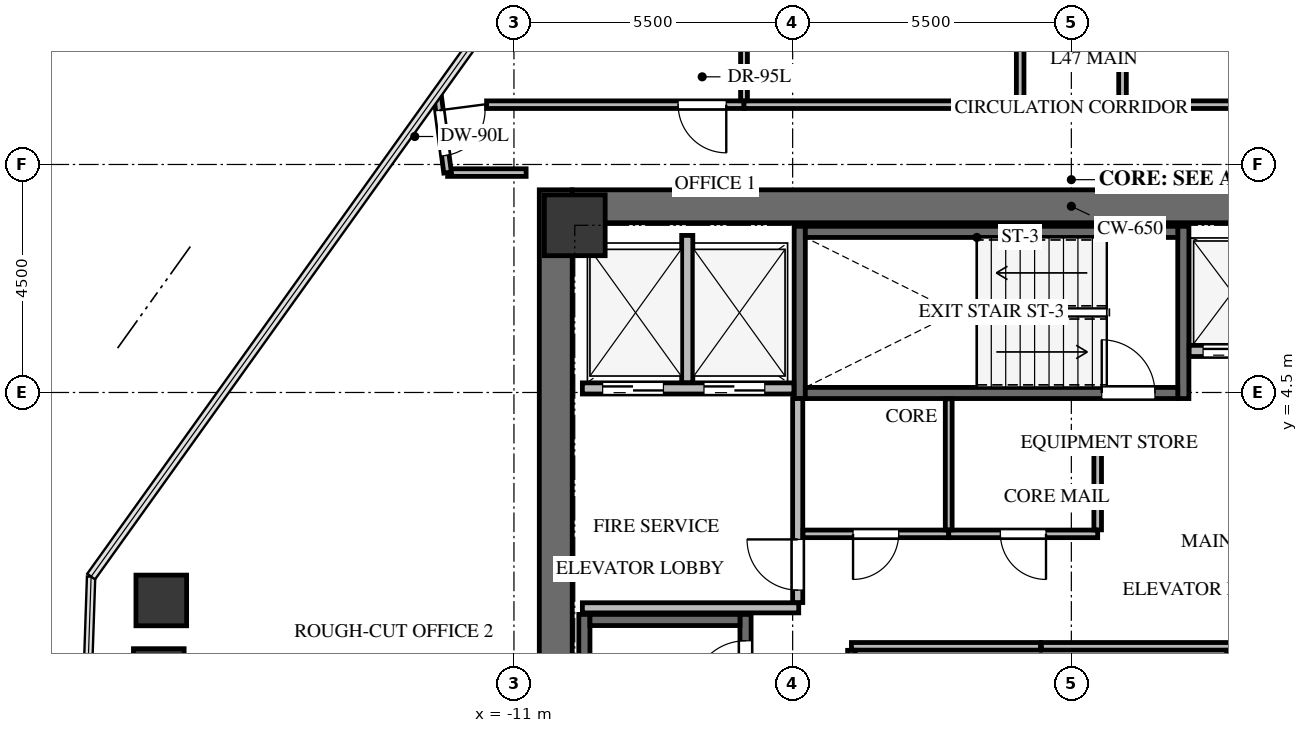
"""IFC4 building model, lengths in metres.
Left out: names, types, materials, properties, quantities, classifications, styles, units other than length and angle.
Written with IfcOpenShell. Run it as: python <this file> out.ifc"""

import sys

from ifc_helpers import new_model, si_unit, direction, frame, frame_2d, origin, origin_2d, place, context, subcontext, project, spatial, rectangle, extrude, source, transform, mapped, element, fill, save


model = new_model("IFC4")
c1 = context("Model", 3, precision=1e-05, world=origin(), true_north=direction((0.0, 1.0)))
c2 = subcontext(c1, "Body", "Model", "MODEL_VIEW")
j1 = project(units=[si_unit("LENGTHUNIT", "METRE"), si_unit("PLANEANGLEUNIT", "RADIAN")], contexts=[c1])
p1 = place(None, origin())
s1 = spatial("IfcSite", under=j1, at=p1, CompositionType="ELEMENT")
p2 = place(p1, origin())
s2 = spatial("IfcBuilding", under=s1, at=p2, CompositionType="ELEMENT")
p3 = place(p2, frame((0.0, 0.0, 173.8)))
s3 = spatial("IfcBuildingStorey", under=s2, at=p3, CompositionType="ELEMENT", Elevation=173.8)
p4 = place(p3, frame((-10.175, -8.5, 0.0), z_axis=(0.0, 0.0, 1.0), x_axis=(0.0, 1.0, 0.0)))
e1 = element("IfcWall", 1, at=p4, inside=s3, PredefinedType="SHEAR", context=c2, shape_type="SweptSolid", body=[
    extrude(rectangle(XDim=17.0, YDim=0.65, at=frame_2d((8.5, 0.0))), origin(), (0.0, 0.0, 1.0), 3.3),
])
p5 = place(p3, frame((-9.85, 8.175, 0.0), z_axis=(0.0, 0.0, 1.0), x_axis=(1.0, 0.0, 0.0)))
e2 = element("IfcWall", 2, at=p5, inside=s3, PredefinedType="SHEAR", context=c2, shape_type="SweptSolid", body=[
    extrude(rectangle(XDim=19.7, YDim=0.65, at=frame_2d((9.85, 0.0))), origin(), (0.0, 0.0, 1.0), 3.3),
])
p6 = place(p3, frame((-6.43, -7.77, -0.24), z_axis=(0.0, 0.0, 1.0), x_axis=(0.0, 1.0, 0.0)))
e3 = element("IfcWall", 3, at=p6, inside=s3, PredefinedType="SHEAR", context=c2, shape_type="SweptSolid", body=[
    extrude(rectangle(XDim=7.89, YDim=0.22, at=frame_2d((3.945, 0.0))), origin(), (0.0, 0.0, 1.0), 3.3),
])
p7 = place(p6, frame((6.32, 0.0, 0.0)))
e4 = element("IfcOpeningElement", 4, at=p7, cuts=e3, PredefinedType="OPENING", context=c2, shape_type="SweptSolid", body=[
    extrude(rectangle(XDim=1.05, YDim=2.15, at=frame_2d((0.525, 1.075))), frame((0.0, 0.12, 0.0), z_axis=(0.0, -1.0, 0.0), x_axis=(1.0, 0.0, 0.0)), (0.0, 0.0, 1.0), 0.24),
])
p8 = place(p3, frame((-9.61, 0.12, -0.24), z_axis=(0.0, 0.0, 1.0), x_axis=(0.0, -1.0, 0.0)))
e5 = element("IfcWall", 5, at=p8, inside=s3, PredefinedType="SHEAR", context=c2, shape_type="SweptSolid", body=[
    extrude(rectangle(XDim=7.89, YDim=0.22, at=frame_2d((3.945, 0.0))), origin(), (0.0, 0.0, 1.0), 3.3),
])
p9 = place(p3, frame((-6.54, 0.01, -0.24), z_axis=(0.0, 0.0, 1.0), x_axis=(-1.0, 0.0, 0.0)))
e6 = element("IfcWall", 6, at=p9, inside=s3, PredefinedType="SHEAR", context=c2, shape_type="SweptSolid", body=[
    extrude(rectangle(XDim=2.96, YDim=0.22, at=frame_2d((1.48, 0.0))), origin(), (0.0, 0.0, 1.0), 3.3),
])
for number, where, z_axis, x_axis in (
    (7, (2.21, 4.38, -0.24), (0.0, 0.0, 1.0), (0.0, 1.0, 0.0)),
    (8, (-5.36, 7.78, -0.24), (0.0, 0.0, 1.0), (0.0, -1.0, 0.0)),
):
    element("IfcWall", number, at=place(p3, frame(where, z_axis=z_axis, x_axis=x_axis)), inside=s3, PredefinedType="SHEAR", context=c2, shape_type="SweptSolid", body=[
        extrude(rectangle(XDim=3.4, YDim=0.22, at=frame_2d((1.7, 0.0))), origin(), (0.0, 0.0, 1.0), 3.3),
    ])
p10 = place(p3, frame((-5.25, 4.49, -0.24), z_axis=(0.0, 0.0, 1.0), x_axis=(1.0, 0.0, 0.0)))
e9 = element("IfcWall", 9, at=p10, inside=s3, PredefinedType="SHEAR", context=c2, shape_type="SweptSolid", body=[
    extrude(rectangle(XDim=7.35, YDim=0.22, at=frame_2d((3.675, 0.0))), origin(), (0.0, 0.0, 1.0), 3.3),
])
p11 = place(p10, frame((5.85, 0.0, 0.0)))
e10 = element("IfcOpeningElement", 10, at=p11, cuts=e9, PredefinedType="OPENING", context=c2, shape_type="SweptSolid", body=[
    extrude(rectangle(XDim=1.05, YDim=2.15, at=frame_2d((0.525, 1.075))), frame((0.0, 0.12, 0.0), z_axis=(0.0, -1.0, 0.0), x_axis=(1.0, 0.0, 0.0)), (0.0, 0.0, 1.0), 0.24),
])
p12 = place(p3, frame((2.1, 7.67, -0.24), z_axis=(0.0, 0.0, 1.0), x_axis=(-1.0, 0.0, 0.0)))
e11 = element("IfcWall", 11, at=p12, inside=s3, PredefinedType="SHEAR", context=c2, shape_type="SweptSolid", body=[
    extrude(rectangle(XDim=7.35, YDim=0.22, at=frame_2d((3.675, 0.0))), origin(), (0.0, 0.0, 1.0), 3.3),
])
m1 = source(origin(), c2, "Body", "SweptSolid", [
    extrude(rectangle(XDim=1.2, YDim=1.2, at=origin_2d()), origin(), (0.0, 0.0, 1.0), 3.3),
])
p13 = place(p3, frame((-9.8, 7.8, -0.24), z_axis=(0.0, 0.0, 1.0), x_axis=(1.0, 0.0, 0.0)))
e12 = element("IfcColumn", 12, at=p13, inside=s3, PredefinedType="COLUMN", context=c2, shape_type="MappedRepresentation", body=[
    mapped(m1, transform((0.0, 0.0, 0.0), x_axis=(1.0, 0.0, 0.0), y_axis=(0.0, 1.0, 0.0), z_axis=(0.0, 0.0, 1.0), scale=1.0)),
])
m2 = source(origin(), c2, "Body", "SweptSolid", [
    extrude(rectangle(XDim=1.0, YDim=1.0, at=origin_2d()), origin(), (0.0, 0.0, 1.0), 3.3),
])
for number, where, z_axis, x_axis in (
    (13, (-18.009, -1.057, -0.24), (0.0, 0.0, 1.0), (1.0, 0.0, 0.0)),
    (14, (-17.96, 0.396, -0.24), (0.0, 0.0, 1.0), (1.0, 0.0, 0.0)),
):
    element("IfcColumn", number, at=place(p3, frame(where, z_axis=z_axis, x_axis=x_axis)), inside=s3, PredefinedType="COLUMN", context=c2, shape_type="MappedRepresentation", body=[
        mapped(m2, transform((0.0, 0.0, 0.0), x_axis=(1.0, 0.0, 0.0), y_axis=(0.0, 1.0, 0.0), z_axis=(0.0, 0.0, 1.0), scale=1.0)),
    ])
p14 = place(p3, frame((-9.65, 4.58, 0.0), z_axis=(0.0, 0.0, 1.0), x_axis=(1.0, 0.0, 0.0)))
e15 = element("IfcWall", 15, at=p14, inside=s3, PredefinedType="SOLIDWALL", context=c2, shape_type="SweptSolid", body=[
    extrude(rectangle(XDim=4.175, YDim=0.22, at=frame_2d((2.087, 0.0))), origin(), (0.0, 0.0, 1.0), 3.045),
])
p15 = place(p14, frame((0.4, 0.0, 0.0)))
e16 = element("IfcOpeningElement", 16, at=p15, cuts=e15, PredefinedType="OPENING", context=c2, shape_type="SweptSolid", body=[
    extrude(rectangle(XDim=1.2, YDim=2.15, at=frame_2d((0.6, 1.075))), frame((0.0, 0.12, 0.0), z_axis=(0.0, -1.0, 0.0), x_axis=(1.0, 0.0, 0.0)), (0.0, 0.0, 1.0), 0.24),
])
p16 = place(p14, frame((2.4, 0.0, 0.0)))
e17 = element("IfcOpeningElement", 17, at=p16, cuts=e15, PredefinedType="OPENING", context=c2, shape_type="SweptSolid", body=[
    extrude(rectangle(XDim=1.2, YDim=2.15, at=frame_2d((0.6, 1.075))), frame((0.0, 0.12, 0.0), z_axis=(0.0, -1.0, 0.0), x_axis=(1.0, 0.0, 0.0)), (0.0, 0.0, 1.0), 0.24),
])
p17 = place(p3, frame((-7.58, 4.694, 0.0), z_axis=(0.0, 0.0, 1.0), x_axis=(0.0, 1.0, 0.0)))
e18 = element("IfcWall", 18, at=p17, inside=s3, PredefinedType="SOLIDWALL", context=c2, shape_type="SweptSolid", body=[
    extrude(rectangle(XDim=2.906, YDim=0.22, at=frame_2d((1.453, 0.0))), origin(), (0.0, 0.0, 1.0), 3.045),
])
p18 = place(p3, frame((-9.65, 0.25, 0.0), z_axis=(0.0, 0.0, 1.0), x_axis=(1.0, 0.0, 0.0)))
e19 = element("IfcWall", 19, at=p18, inside=s3, PredefinedType="SOLIDWALL", context=c2, shape_type="SweptSolid", body=[
    extrude(rectangle(XDim=4.27, YDim=0.2, at=frame_2d((2.135, 0.0))), origin(), (0.0, 0.0, 1.0), 3.045),
])
p19 = place(p3, frame((-5.4, 0.354, 0.0), z_axis=(0.0, 0.0, 1.0), x_axis=(0.0, 1.0, 0.0)))
e20 = element("IfcWall", 20, at=p19, inside=s3, PredefinedType="SOLIDWALL", context=c2, shape_type="SweptSolid", body=[
    extrude(rectangle(XDim=4.026, YDim=0.2, at=frame_2d((2.013, 0.0))), origin(), (0.0, 0.0, 1.0), 3.045),
])
p20 = place(p19, frame((0.246, 0.0, 0.0)))
e21 = element("IfcOpeningElement", 21, at=p20, cuts=e20, PredefinedType="OPENING", context=c2, shape_type="SweptSolid", body=[
    extrude(rectangle(XDim=1.0, YDim=2.15, at=frame_2d((0.5, 1.075))), frame((0.0, 0.11, 0.0), z_axis=(0.0, -1.0, 0.0), x_axis=(1.0, 0.0, 0.0)), (0.0, 0.0, 1.0), 0.22),
])
p21 = place(p3, frame((2.325, 5.32, 0.0), z_axis=(0.0, 0.0, 1.0), x_axis=(1.0, 0.0, 0.0)))
e22 = element("IfcWall", 22, at=p21, inside=s3, PredefinedType="SOLIDWALL", context=c2, shape_type="SweptSolid", body=[
    extrude(rectangle(XDim=7.325, YDim=0.22, at=frame_2d((3.663, 0.0))), origin(), (0.0, 0.0, 1.0), 3.045),
])
p22 = place(p21, frame((0.275, 0.0, 0.0)))
e23 = element("IfcOpeningElement", 23, at=p22, cuts=e22, PredefinedType="OPENING", context=c2, shape_type="SweptSolid", body=[
    extrude(rectangle(XDim=1.1, YDim=2.15, at=frame_2d((0.55, 1.075))), frame((0.0, 0.12, 0.0), z_axis=(0.0, -1.0, 0.0), x_axis=(1.0, 0.0, 0.0)), (0.0, 0.0, 1.0), 0.24),
])
p23 = place(p21, frame((2.045, 0.0, 0.0)))
e24 = element("IfcOpeningElement", 24, at=p23, cuts=e22, PredefinedType="OPENING", context=c2, shape_type="SweptSolid", body=[
    extrude(rectangle(XDim=1.1, YDim=2.15, at=frame_2d((0.55, 1.075))), frame((0.0, 0.12, 0.0), z_axis=(0.0, -1.0, 0.0), x_axis=(1.0, 0.0, 0.0)), (0.0, 0.0, 1.0), 0.24),
])
p24 = place(p21, frame((3.815, 0.0, 0.0)))
e25 = element("IfcOpeningElement", 25, at=p24, cuts=e22, PredefinedType="OPENING", context=c2, shape_type="SweptSolid", body=[
    extrude(rectangle(XDim=1.1, YDim=2.15, at=frame_2d((0.55, 1.075))), frame((0.0, 0.12, 0.0), z_axis=(0.0, -1.0, 0.0), x_axis=(1.0, 0.0, 0.0)), (0.0, 0.0, 1.0), 0.24),
])
p25 = place(p21, frame((5.585, 0.0, 0.0)))
e26 = element("IfcOpeningElement", 26, at=p25, cuts=e22, PredefinedType="OPENING", context=c2, shape_type="SweptSolid", body=[
    extrude(rectangle(XDim=1.1, YDim=2.15, at=frame_2d((0.55, 1.075))), frame((0.0, 0.12, 0.0), z_axis=(0.0, -1.0, 0.0), x_axis=(1.0, 0.0, 0.0)), (0.0, 0.0, 1.0), 0.24),
])
p26 = place(p3, frame((-4.34, -0.51, 0.0), z_axis=(0.0, 0.0, 1.0), x_axis=(1.0, 0.0, 0.0)))
e27 = element("IfcWall", 27, at=p26, inside=s3, PredefinedType="PARTITIONING", context=c2, shape_type="SweptSolid", body=[
    extrude(rectangle(XDim=3.73, YDim=0.15, at=frame_2d((1.865, 0.0))), origin(), (0.0, 0.0, 1.0), 3.045),
])
p27 = place(p3, frame((-4.34, -2.961, 0.0), z_axis=(0.0, 0.0, 1.0), x_axis=(0.0, 1.0, 0.0)))
e28 = element("IfcWall", 28, at=p27, inside=s3, PredefinedType="PARTITIONING", context=c2, shape_type="SweptSolid", body=[
    extrude(rectangle(XDim=2.372, YDim=0.15, at=frame_2d((1.186, 0.0))), origin(), (0.0, 0.0, 1.0), 3.045),
])
p28 = place(p3, frame((-0.59, -0.51, 0.0), z_axis=(0.0, 0.0, 1.0), x_axis=(1.0, 0.0, 0.0)))
e29 = element("IfcWall", 29, at=p28, inside=s3, PredefinedType="PARTITIONING", context=c2, shape_type="SweptSolid", body=[
    extrude(rectangle(XDim=3.73, YDim=0.15, at=frame_2d((1.865, 0.0))), origin(), (0.0, 0.0, 1.0), 3.045),
])
p29 = place(p3, frame((3.14, -0.589, 0.0), z_axis=(0.0, 0.0, 1.0), x_axis=(0.0, -1.0, 0.0)))
e30 = element("IfcWall", 30, at=p29, inside=s3, PredefinedType="PARTITIONING", context=c2, shape_type="SweptSolid", body=[
    extrude(rectangle(XDim=2.372, YDim=0.15, at=frame_2d((1.186, 0.0))), origin(), (0.0, 0.0, 1.0), 3.045),
])
p30 = place(p3, frame((-2.42, 1.71, 0.0), z_axis=(0.0, 0.0, 1.0), x_axis=(-1.0, 0.0, 0.0)))
e31 = element("IfcWall", 31, at=p30, inside=s3, PredefinedType="PARTITIONING", context=c2, shape_type="SweptSolid", body=[
    extrude(rectangle(XDim=2.876, YDim=0.15, at=frame_2d((1.438, 0.0))), origin(), (0.0, 0.0, 1.0), 3.045),
])
p31 = place(p30, frame((0.988, 0.0, 0.0)))
e32 = element("IfcOpeningElement", 32, at=p31, cuts=e31, PredefinedType="OPENING", context=c2, shape_type="SweptSolid", body=[
    extrude(rectangle(XDim=0.9, YDim=2.05, at=frame_2d((0.45, 1.025))), frame((0.0, 0.085, 0.0), z_axis=(0.0, -1.0, 0.0), x_axis=(1.0, 0.0, 0.0)), (0.0, 0.0, 1.0), 0.17),
])
p32 = place(p3, frame((0.52, 1.71, 0.0), z_axis=(0.0, 0.0, 1.0), x_axis=(-1.0, 0.0, 0.0)))
e33 = element("IfcWall", 33, at=p32, inside=s3, PredefinedType="PARTITIONING", context=c2, shape_type="SweptSolid", body=[
    extrude(rectangle(XDim=2.94, YDim=0.15, at=frame_2d((1.47, 0.0))), origin(), (0.0, 0.0, 1.0), 3.045),
])
p33 = place(p32, frame((1.02, 0.0, 0.0)))
e34 = element("IfcOpeningElement", 34, at=p33, cuts=e33, PredefinedType="OPENING", context=c2, shape_type="SweptSolid", body=[
    extrude(rectangle(XDim=0.9, YDim=2.05, at=frame_2d((0.45, 1.025))), frame((0.0, 0.085, 0.0), z_axis=(0.0, -1.0, 0.0), x_axis=(1.0, 0.0, 0.0)), (0.0, 0.0, 1.0), 0.17),
])
p34 = place(p3, frame((0.52, 3.3, 0.0), z_axis=(0.0, 0.0, 1.0), x_axis=(0.0, -1.0, 0.0)))
e35 = element("IfcWall", 35, at=p34, inside=s3, PredefinedType="PARTITIONING", context=c2, shape_type="SweptSolid", body=[
    extrude(rectangle(XDim=1.511, YDim=0.15, at=frame_2d((0.755, 0.0))), origin(), (0.0, 0.0, 1.0), 3.045),
])
p35 = place(p3, frame((-6.46, 10.18, 0.0), z_axis=(0.0, 0.0, 1.0), x_axis=(-1.0, 0.0, 0.0)))
e36 = element("IfcWall", 36, at=p35, inside=s3, PredefinedType="PARTITIONING", context=c2, shape_type="SweptSolid", body=[
    extrude(rectangle(XDim=5.08, YDim=0.15, at=frame_2d((2.54, 0.0))), origin(), (0.0, 0.0, 1.0), 2.242),
])
p36 = place(p35, frame((0.35, 0.0, 0.0)))
e37 = element("IfcOpeningElement", 37, at=p36, cuts=e36, PredefinedType="OPENING", context=c2, shape_type="SweptSolid", body=[
    extrude(rectangle(XDim=0.95, YDim=2.1, at=frame_2d((0.475, 1.05))), frame((0.0, 0.085, 0.0), z_axis=(0.0, -1.0, 0.0), x_axis=(1.0, 0.0, 0.0)), (0.0, 0.0, 1.0), 0.17),
])
p37 = place(p3, frame((-1.01, 16.418, 0.0), z_axis=(0.0, 0.0, 1.0), x_axis=(0.0, -1.0, 0.0)))
e38 = element("IfcWall", 38, at=p37, inside=s3, PredefinedType="PARTITIONING", context=c2, shape_type="SweptSolid", body=[
    extrude(rectangle(XDim=6.238, YDim=0.15, at=frame_2d((3.119, 0.0))), origin(), (0.0, 0.0, 1.0), 2.399),
])
p38 = place(p37, frame((2.659, 0.0, 0.0)))
e39 = element("IfcOpeningElement", 39, at=p38, cuts=e38, PredefinedType="OPENING", context=c2, shape_type="SweptSolid", body=[
    extrude(rectangle(XDim=0.92, YDim=2.1, at=frame_2d((0.46, 1.05))), frame((0.0, 0.085, 0.0), z_axis=(0.0, -1.0, 0.0), x_axis=(1.0, 0.0, 0.0)), (0.0, 0.0, 1.0), 0.17),
])
p39 = place(p3, frame((-1.089, 10.18, 0.0), z_axis=(0.0, 0.0, 1.0), x_axis=(-1.0, 0.0, 0.0)))
e40 = element("IfcWall", 40, at=p39, inside=s3, PredefinedType="PARTITIONING", context=c2, shape_type="SweptSolid", body=[
    extrude(rectangle(XDim=5.371, YDim=0.15, at=frame_2d((2.686, 0.0))), origin(), (0.0, 0.0, 1.0), 2.242),
])
p40 = place(p3, frame((1.01, 10.18, 0.0), z_axis=(0.0, 0.0, 1.0), x_axis=(0.0, 1.0, 0.0)))
e41 = element("IfcWall", 41, at=p40, inside=s3, PredefinedType="PARTITIONING", context=c2, shape_type="SweptSolid", body=[
    extrude(rectangle(XDim=6.238, YDim=0.15, at=frame_2d((3.119, 0.0))), origin(), (0.0, 0.0, 1.0), 2.399),
])
p41 = place(p40, frame((2.644, 0.0, 0.0)))
e42 = element("IfcOpeningElement", 42, at=p41, cuts=e41, PredefinedType="OPENING", context=c2, shape_type="SweptSolid", body=[
    extrude(rectangle(XDim=0.95, YDim=2.1, at=frame_2d((0.475, 1.05))), frame((0.0, 0.085, 0.0), z_axis=(0.0, -1.0, 0.0), x_axis=(1.0, 0.0, 0.0)), (0.0, 0.0, 1.0), 0.17),
])
p42 = place(p3, frame((3.54, 10.18, 0.0), z_axis=(0.0, 0.0, 1.0), x_axis=(-1.0, 0.0, 0.0)))
e43 = element("IfcWall", 43, at=p42, inside=s3, PredefinedType="PARTITIONING", context=c2, shape_type="SweptSolid", body=[
    extrude(rectangle(XDim=2.451, YDim=0.15, at=frame_2d((1.226, 0.0))), origin(), (0.0, 0.0, 1.0), 3.045),
])
p43 = place(p3, frame((-12.31, 8.84, 0.0), z_axis=(0.0, 0.0, 1.0), x_axis=(1.0, 0.0, 0.0)))
e44 = element("IfcWall", 44, at=p43, inside=s3, PredefinedType="PARTITIONING", context=c2, shape_type="SweptSolid", body=[
    extrude(rectangle(XDim=1.55, YDim=0.15, at=frame_2d((0.775, 0.0))), origin(), (0.0, 0.0, 1.0), 2.399),
])
p44 = place(p3, frame((-12.514, 10.406, 0.0), z_axis=(0.0, 0.0, 1.0), x_axis=(0.129378833178, -0.991595238757, 0.0)))
e45 = element("IfcWall", 45, at=p44, inside=s3, PredefinedType="PARTITIONING", context=c2, shape_type="SweptSolid", body=[
    extrude(rectangle(XDim=1.579, YDim=0.15, at=frame_2d((0.79, 0.0))), origin(), (0.0, 0.0, 1.0), 3.045),
])
p45 = place(p44, frame((0.34, 0.0, 0.0)))
e46 = element("IfcOpeningElement", 46, at=p45, cuts=e45, PredefinedType="OPENING", context=c2, shape_type="SweptSolid", body=[
    extrude(rectangle(XDim=0.9, YDim=2.05, at=frame_2d((0.45, 1.025))), frame((0.0, 0.085, 0.0), z_axis=(0.0, -1.0, 0.0), x_axis=(1.0, 0.0, 0.0)), (0.0, 0.0, 1.0), 0.17),
])
p46 = place(p3, frame((-2.42, 4.375, 0.0), z_axis=(0.0, 0.0, 1.0), x_axis=(0.0, -1.0, 0.0)))
e47 = element("IfcWall", 47, at=p46, inside=s3, PredefinedType="PARTITIONING", context=c2, shape_type="SweptSolid", body=[
    extrude(rectangle(XDim=2.586, YDim=0.135, at=frame_2d((1.293, 0.0))), origin(), (0.0, 0.0, 1.0), 3.045),
])
p47 = place(p3, frame((-6.46, 15.102, 0.0), z_axis=(0.0, 0.0, 1.0), x_axis=(0.0, -1.0, 0.0)))
e48 = element("IfcWall", 48, at=p47, inside=s3, PredefinedType="PARTITIONING", context=c2, shape_type="SweptSolid", body=[
    extrude(rectangle(XDim=4.843, YDim=0.135, at=frame_2d((2.421, 0.0))), origin(), (0.0, 0.0, 1.0), 2.242),
])
m3 = source(origin(), c2, "Body", "SweptSolid", [
    extrude(rectangle(XDim=1.05, YDim=2.15, at=frame_2d((0.525, 1.075))), frame((0.0, 0.025, 0.0), z_axis=(0.0, -1.0, 0.0), x_axis=(1.0, 0.0, 0.0)), (0.0, 0.0, 1.0), 0.05),
])
p48 = place(p7, origin())
e49 = element("IfcDoor", 49, at=p48, inside=s3, OperationType="SINGLE_SWING_LEFT", PredefinedType="DOOR", context=c2, shape_type="MappedRepresentation", body=[
    mapped(m3, transform((0.0, 0.0, 0.0), x_axis=(1.0, 0.0, 0.0), y_axis=(0.0, 1.0, 0.0), z_axis=(0.0, 0.0, 1.0), scale=1.0)),
])
fill(e4, e49)
p49 = place(p11, origin())
e50 = element("IfcDoor", 50, at=p49, inside=s3, OperationType="SINGLE_SWING_LEFT", PredefinedType="DOOR", context=c2, shape_type="MappedRepresentation", body=[
    mapped(m3, transform((0.0, 0.0, 0.0), x_axis=(1.0, 0.0, 0.0), y_axis=(0.0, 1.0, 0.0), z_axis=(0.0, 0.0, 1.0), scale=1.0)),
])
fill(e10, e50)
m4 = source(origin(), c2, "Body", "SweptSolid", [
    extrude(rectangle(XDim=1.2, YDim=2.15, at=frame_2d((0.6, 1.075))), frame((0.0, 0.025, 0.0), z_axis=(0.0, -1.0, 0.0), x_axis=(1.0, 0.0, 0.0)), (0.0, 0.0, 1.0), 0.05),
])
p50 = place(p15, origin())
e51 = element("IfcDoor", 51, at=p50, inside=s3, OperationType="DOUBLE_DOOR_SLIDING", PredefinedType="DOOR", context=c2, shape_type="MappedRepresentation", body=[
    mapped(m4, transform((0.0, 0.0, 0.0), x_axis=(1.0, 0.0, 0.0), y_axis=(0.0, 1.0, 0.0), z_axis=(0.0, 0.0, 1.0), scale=1.0)),
])
fill(e16, e51)
p51 = place(p16, origin())
e52 = element("IfcDoor", 52, at=p51, inside=s3, OperationType="DOUBLE_DOOR_SLIDING", PredefinedType="DOOR", context=c2, shape_type="MappedRepresentation", body=[
    mapped(m4, transform((0.0, 0.0, 0.0), x_axis=(1.0, 0.0, 0.0), y_axis=(0.0, 1.0, 0.0), z_axis=(0.0, 0.0, 1.0), scale=1.0)),
])
fill(e17, e52)
m5 = source(origin(), c2, "Body", "SweptSolid", [
    extrude(rectangle(XDim=1.0, YDim=2.15, at=frame_2d((0.5, 1.075))), frame((0.0, 0.025, 0.0), z_axis=(0.0, -1.0, 0.0), x_axis=(1.0, 0.0, 0.0)), (0.0, 0.0, 1.0), 0.05),
])
p52 = place(p20, origin())
e53 = element("IfcDoor", 53, at=p52, inside=s3, OperationType="SINGLE_SWING_RIGHT", PredefinedType="DOOR", context=c2, shape_type="MappedRepresentation", body=[
    mapped(m5, transform((0.0, 0.0, 0.0), x_axis=(1.0, 0.0, 0.0), y_axis=(0.0, 1.0, 0.0), z_axis=(0.0, 0.0, 1.0), scale=1.0)),
])
fill(e21, e53)
m6 = source(origin(), c2, "Body", "SweptSolid", [
    extrude(rectangle(XDim=1.1, YDim=2.15, at=frame_2d((0.55, 1.075))), frame((0.0, 0.025, 0.0), z_axis=(0.0, -1.0, 0.0), x_axis=(1.0, 0.0, 0.0)), (0.0, 0.0, 1.0), 0.05),
])
p53 = place(p22, origin())
e54 = element("IfcDoor", 54, at=p53, inside=s3, OperationType="DOUBLE_DOOR_SLIDING", PredefinedType="DOOR", context=c2, shape_type="MappedRepresentation", body=[
    mapped(m6, transform((0.0, 0.0, 0.0), x_axis=(1.0, 0.0, 0.0), y_axis=(0.0, 1.0, 0.0), z_axis=(0.0, 0.0, 1.0), scale=1.0)),
])
fill(e23, e54)
m7 = source(origin(), c2, "Body", "SweptSolid", [
    extrude(rectangle(XDim=0.9, YDim=2.05, at=frame_2d((0.45, 1.025))), frame((0.0, 0.025, 0.0), z_axis=(0.0, -1.0, 0.0), x_axis=(1.0, 0.0, 0.0)), (0.0, 0.0, 1.0), 0.05),
])
p54 = place(p31, origin())
e55 = element("IfcDoor", 55, at=p54, inside=s3, OperationType="SINGLE_SWING_RIGHT", PredefinedType="DOOR", context=c2, shape_type="MappedRepresentation", body=[
    mapped(m7, transform((0.0, 0.0, 0.0), x_axis=(1.0, 0.0, 0.0), y_axis=(0.0, 1.0, 0.0), z_axis=(0.0, 0.0, 1.0), scale=1.0)),
])
fill(e32, e55)
m8 = source(origin(), c2, "Body", "SweptSolid", [
    extrude(rectangle(XDim=0.9, YDim=2.05, at=frame_2d((0.45, 1.025))), frame((0.0, 0.025, 0.0), z_axis=(0.0, -1.0, 0.0), x_axis=(1.0, 0.0, 0.0)), (0.0, 0.0, 1.0), 0.05),
])
p55 = place(p33, origin())
e56 = element("IfcDoor", 56, at=p55, inside=s3, OperationType="SINGLE_SWING_LEFT", PredefinedType="DOOR", context=c2, shape_type="MappedRepresentation", body=[
    mapped(m8, transform((0.0, 0.0, 0.0), x_axis=(1.0, 0.0, 0.0), y_axis=(0.0, 1.0, 0.0), z_axis=(0.0, 0.0, 1.0), scale=1.0)),
])
fill(e34, e56)
m9 = source(origin(), c2, "Body", "SweptSolid", [
    extrude(rectangle(XDim=0.95, YDim=2.1, at=frame_2d((0.475, 1.05))), frame((0.0, 0.025, 0.0), z_axis=(0.0, -1.0, 0.0), x_axis=(1.0, 0.0, 0.0)), (0.0, 0.0, 1.0), 0.05),
])
p56 = place(p36, origin())
e57 = element("IfcDoor", 57, at=p56, inside=s3, OperationType="SINGLE_SWING_LEFT", PredefinedType="DOOR", context=c2, shape_type="MappedRepresentation", body=[
    mapped(m9, transform((0.0, 0.0, 0.0), x_axis=(1.0, 0.0, 0.0), y_axis=(0.0, 1.0, 0.0), z_axis=(0.0, 0.0, 1.0), scale=1.0)),
])
fill(e37, e57)
m10 = source(origin(), c2, "Body", "SweptSolid", [
    extrude(rectangle(XDim=0.9, YDim=2.05, at=frame_2d((0.45, 1.025))), frame((0.0, 0.025, 0.0), z_axis=(0.0, -1.0, 0.0), x_axis=(1.0, 0.0, 0.0)), (0.0, 0.0, 1.0), 0.05),
])
p57 = place(p45, origin())
e58 = element("IfcDoor", 58, at=p57, inside=s3, OperationType="SINGLE_SWING_LEFT", PredefinedType="DOOR", context=c2, shape_type="MappedRepresentation", body=[
    mapped(m10, transform((0.0, 0.0, 0.0), x_axis=(1.0, 0.0, 0.0), y_axis=(0.0, 1.0, 0.0), z_axis=(0.0, 0.0, 1.0), scale=1.0)),
])
fill(e46, e58)
save(model, sys.argv[1])
